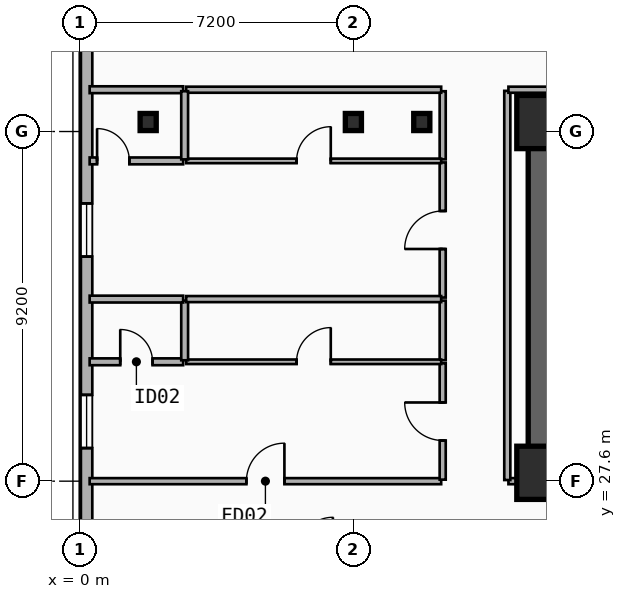
"""IFC4 building model, lengths in metres.
Left out: names, types, materials, properties, quantities, classifications, styles, units other than length and angle.
Written with IfcOpenShell. Run it as: python <this file> out.ifc"""

import sys

from ifc_helpers import new_model, si_unit, direction, frame, frame_2d, origin, origin_2d, place, context, subcontext, project, spatial, rectangle, i_section, extrude, element, fill, save


model = new_model("IFC4")
c1 = context("Model", 3, precision=1e-05, world=origin(), true_north=direction((0.0, 1.0)))
c2 = subcontext(c1, "Body", "Model", "MODEL_VIEW")
j1 = project(units=[si_unit("LENGTHUNIT", "METRE"), si_unit("PLANEANGLEUNIT", "RADIAN")], contexts=[c1])
p1 = place(None, origin())
s1 = spatial("IfcSite", under=j1, at=p1, CompositionType="ELEMENT")
p2 = place(p1, origin())
s2 = spatial("IfcBuilding", under=s1, at=p2, CompositionType="ELEMENT")
p3 = place(p2, frame((0.0, 0.0, 53.5)))
s3 = spatial("IfcBuildingStorey", under=s2, at=p3, CompositionType="ELEMENT", Elevation=53.5)
p4 = place(p3, frame((12.15, 37.05, 0.0), z_axis=(0.0, 0.0, 1.0), x_axis=(1.0, 0.0, 0.0)))
e1 = element("IfcWall", 1, at=p4, inside=s3, PredefinedType="SHEAR", context=c2, shape_type="SweptSolid", body=[
    extrude(rectangle(XDim=33.23, YDim=0.7, at=frame_2d((16.615, 0.0))), origin(), (0.0, 0.0, 1.0), 3.5),
])
p5 = place(p3, frame((21.18, 27.82, 0.0), z_axis=(0.0, 0.0, 1.0), x_axis=(-1.0, 0.0, 0.0)))
e2 = element("IfcWall", 2, at=p5, inside=s3, PredefinedType="SHEAR", context=c2, shape_type="SweptSolid", body=[
    extrude(rectangle(XDim=9.03, YDim=0.7, at=frame_2d((4.515, 0.0))), origin(), (0.0, 0.0, 1.0), 3.5),
])
p6 = place(p5, frame((2.68, 0.0, 0.0)))
e3 = element("IfcOpeningElement", 3, at=p6, cuts=e2, PredefinedType="OPENING", context=c2, shape_type="SweptSolid", body=[
    extrude(rectangle(XDim=1.1, YDim=2.15, at=frame_2d((0.55, 1.075))), frame((0.0, 0.36, 0.0), z_axis=(0.0, -1.0, 0.0), x_axis=(1.0, 0.0, 0.0)), (0.0, 0.0, 1.0), 0.72),
])
p7 = place(p3, frame((12.15, 28.17, 0.0), z_axis=(0.0, 0.0, 1.0), x_axis=(0.0, 1.0, 0.0)))
e4 = element("IfcWall", 4, at=p7, inside=s3, PredefinedType="SHEAR", context=c2, shape_type="SweptSolid", body=[
    extrude(rectangle(XDim=8.53, YDim=0.7, at=frame_2d((4.265, 0.0))), origin(), (0.0, 0.0, 1.0), 3.5),
])
for number, where, z_axis, x_axis in (
    (5, (12.2, 27.82, 0.0), (0.0, 0.0, 1.0), (1.0, 0.0, 0.0)),
    (6, (12.2, 37.05, 0.0), (0.0, 0.0, 1.0), (1.0, 0.0, 0.0)),
):
    element("IfcColumn", number, at=place(p3, frame(where, z_axis=z_axis, x_axis=x_axis)), inside=s3, PredefinedType="COLUMN", context=c2, shape_type="SweptSolid", body=[
        extrude(rectangle(XDim=1.4, YDim=1.4, at=origin_2d()), origin(), (0.0, 0.0, 1.0), 3.5),
    ])
for number, where, z_axis, x_axis in (
    (7, (9.0, 37.05, 0.0), (0.0, 0.0, 1.0), (1.0, 0.0, 0.0)),
    (8, (1.8, 37.05, 0.0), (0.0, 0.0, 1.0), (1.0, 0.0, 0.0)),
    (9, (7.2, 37.05, 0.0), (0.0, 0.0, 1.0), (1.0, 0.0, 0.0)),
):
    element("IfcColumn", number, at=place(p3, frame(where, z_axis=z_axis, x_axis=x_axis)), inside=s3, PredefinedType="COLUMN", context=c2, shape_type="SweptSolid", body=[
        extrude(i_section(OverallWidth=0.424, OverallDepth=0.45, WebThickness=0.041, FlangeThickness=0.065, FilletRadius=0.015, at=origin_2d()), origin(), (0.0, 0.0, 1.0), 3.5),
    ])
p8 = place(p3, frame((0.18, 25.8, 0.0), z_axis=(0.0, 0.0, 1.0), x_axis=(0.0, 1.0, 0.0)))
e10 = element("IfcWall", 10, at=p8, inside=s3, PredefinedType="SOLIDWALL", context=c2, shape_type="SweptSolid", body=[
    extrude(rectangle(XDim=15.2, YDim=0.3, at=frame_2d((7.6, 0.0))), origin(), (0.0, 0.0, 1.0), 3.24),
])
p9 = place(p8, frame((2.67, 0.0, 0.48)))
e11 = element("IfcOpeningElement", 11, at=p9, cuts=e10, PredefinedType="OPENING", context=c2, shape_type="SweptSolid", body=[
    extrude(rectangle(XDim=1.4, YDim=1.8, at=frame_2d((0.7, 0.9))), frame((0.0, 0.16, 0.0), z_axis=(0.0, -1.0, 0.0), x_axis=(1.0, 0.0, 0.0)), (0.0, 0.0, 1.0), 0.32),
])
p10 = place(p8, frame((7.709, 0.0, 0.48)))
e12 = element("IfcOpeningElement", 12, at=p10, cuts=e10, PredefinedType="OPENING", context=c2, shape_type="SweptSolid", body=[
    extrude(rectangle(XDim=1.4, YDim=1.8, at=frame_2d((0.7, 0.9))), frame((0.0, 0.16, 0.0), z_axis=(0.0, -1.0, 0.0), x_axis=(1.0, 0.0, 0.0)), (0.0, 0.0, 1.0), 0.32),
])
p11 = place(p3, frame((0.26, 27.6, 0.0), z_axis=(0.0, 0.0, 1.0), x_axis=(1.0, 0.0, 0.0)))
e13 = element("IfcWall", 13, at=p11, inside=s3, PredefinedType="PARTITIONING", context=c2, shape_type="SweptSolid", body=[
    extrude(rectangle(XDim=9.25, YDim=0.16, at=frame_2d((4.625, 0.0))), origin(), (0.0, 0.0, 1.0), 2.57),
])
p12 = place(p11, frame((4.125, 0.0, 0.0)))
e14 = element("IfcOpeningElement", 14, at=p12, cuts=e13, PredefinedType="OPENING", context=c2, shape_type="SweptSolid", body=[
    extrude(rectangle(XDim=1.0, YDim=2.15, at=frame_2d((0.5, 1.075))), frame((0.0, 0.09, 0.0), z_axis=(0.0, -1.0, 0.0), x_axis=(1.0, 0.0, 0.0)), (0.0, 0.0, 1.0), 0.18),
])
p13 = place(p3, frame((9.55, 27.64, 0.0), z_axis=(0.0, 0.0, 1.0), x_axis=(0.0, 1.0, 0.0)))
e15 = element("IfcWall", 15, at=p13, inside=s3, PredefinedType="PARTITIONING", context=c2, shape_type="SweptSolid", body=[
    extrude(rectangle(XDim=3.061, YDim=0.16, at=frame_2d((1.531, 0.0))), origin(), (0.0, 0.0, 1.0), 3.24),
])
p14 = place(p13, frame((1.031, 0.0, 0.0)))
e16 = element("IfcOpeningElement", 16, at=p14, cuts=e15, PredefinedType="OPENING", context=c2, shape_type="SweptSolid", body=[
    extrude(rectangle(XDim=1.0, YDim=2.15, at=frame_2d((0.5, 1.075))), frame((0.0, 0.09, 0.0), z_axis=(0.0, -1.0, 0.0), x_axis=(1.0, 0.0, 0.0)), (0.0, 0.0, 1.0), 0.18),
])
p15 = place(p3, frame((9.55, 30.781, 0.0), z_axis=(0.0, 0.0, 1.0), x_axis=(0.0, 1.0, 0.0)))
e17 = element("IfcWall", 17, at=p15, inside=s3, PredefinedType="PARTITIONING", context=c2, shape_type="SweptSolid", body=[
    extrude(rectangle(XDim=1.57, YDim=0.16, at=frame_2d((0.785, 0.0))), origin(), (0.0, 0.0, 1.0), 3.24),
])
p16 = place(p3, frame((9.55, 32.431, 0.0), z_axis=(0.0, 0.0, 1.0), x_axis=(0.0, 1.0, 0.0)))
e18 = element("IfcWall", 18, at=p16, inside=s3, PredefinedType="PARTITIONING", context=c2, shape_type="SweptSolid", body=[
    extrude(rectangle(XDim=3.556, YDim=0.16, at=frame_2d((1.778, 0.0))), origin(), (0.0, 0.0, 1.0), 3.24),
])
p17 = place(p16, frame((1.278, 0.0, 0.0)))
e19 = element("IfcOpeningElement", 19, at=p17, cuts=e18, PredefinedType="OPENING", context=c2, shape_type="SweptSolid", body=[
    extrude(rectangle(XDim=1.0, YDim=2.15, at=frame_2d((0.5, 1.075))), frame((0.0, 0.09, 0.0), z_axis=(0.0, -1.0, 0.0), x_axis=(1.0, 0.0, 0.0)), (0.0, 0.0, 1.0), 0.18),
])
p18 = place(p3, frame((9.55, 36.067, 0.0), z_axis=(0.0, 0.0, 1.0), x_axis=(0.0, 1.0, 0.0)))
e20 = element("IfcWall", 20, at=p18, inside=s3, PredefinedType="PARTITIONING", context=c2, shape_type="SweptSolid", body=[
    extrude(rectangle(XDim=1.793, YDim=0.16, at=frame_2d((0.896, 0.0))), origin(), (0.0, 0.0, 1.0), 2.72),
])
p19 = place(p3, frame((0.26, 37.9, 0.0), z_axis=(0.0, 0.0, 1.0), x_axis=(1.0, 0.0, 0.0)))
e21 = element("IfcWall", 21, at=p19, inside=s3, PredefinedType="PLUMBINGWALL", context=c2, shape_type="SweptSolid", body=[
    extrude(rectangle(XDim=2.46, YDim=0.18, at=frame_2d((1.23, 0.0))), origin(), (0.0, 0.0, 1.0), 3.24),
])
p20 = place(p3, frame((2.8, 37.9, 0.0), z_axis=(0.0, 0.0, 1.0), x_axis=(1.0, 0.0, 0.0)))
e22 = element("IfcWall", 22, at=p20, inside=s3, PredefinedType="PARTITIONING", context=c2, shape_type="SweptSolid", body=[
    extrude(rectangle(XDim=6.71, YDim=0.16, at=frame_2d((3.355, 0.0))), origin(), (0.0, 0.0, 1.0), 3.24),
])
p21 = place(p3, frame((0.26, 30.741, 0.0), z_axis=(0.0, 0.0, 1.0), x_axis=(1.0, 0.0, 0.0)))
e23 = element("IfcWall", 23, at=p21, inside=s3, PredefinedType="PLUMBINGWALL", context=c2, shape_type="SweptSolid", body=[
    extrude(rectangle(XDim=2.46, YDim=0.18, at=frame_2d((1.23, 0.0))), origin(), (0.0, 0.0, 1.0), 2.57),
])
p22 = place(p21, frame((0.805, 0.0, 0.0)))
e24 = element("IfcOpeningElement", 24, at=p22, cuts=e23, PredefinedType="OPENING", context=c2, shape_type="SweptSolid", body=[
    extrude(rectangle(XDim=0.85, YDim=2.1, at=frame_2d((0.425, 1.05))), frame((0.0, 0.1, 0.0), z_axis=(0.0, -1.0, 0.0), x_axis=(1.0, 0.0, 0.0)), (0.0, 0.0, 1.0), 0.2),
])
p23 = place(p3, frame((2.8, 30.741, 0.0), z_axis=(0.0, 0.0, 1.0), x_axis=(1.0, 0.0, 0.0)))
e25 = element("IfcWall", 25, at=p23, inside=s3, PredefinedType="PARTITIONING", context=c2, shape_type="SweptSolid", body=[
    extrude(rectangle(XDim=6.71, YDim=0.12, at=frame_2d((3.355, 0.0))), origin(), (0.0, 0.0, 1.0), 2.57),
])
p24 = place(p23, frame((2.905, 0.0, 0.0)))
e26 = element("IfcOpeningElement", 26, at=p24, cuts=e25, PredefinedType="OPENING", context=c2, shape_type="SweptSolid", body=[
    extrude(rectangle(XDim=0.9, YDim=2.1, at=frame_2d((0.45, 1.05))), frame((0.0, 0.07, 0.0), z_axis=(0.0, -1.0, 0.0), x_axis=(1.0, 0.0, 0.0)), (0.0, 0.0, 1.0), 0.14),
])
p25 = place(p3, frame((2.76, 30.781, 0.0), z_axis=(0.0, 0.0, 1.0), x_axis=(0.0, 1.0, 0.0)))
e27 = element("IfcWall", 27, at=p25, inside=s3, PredefinedType="PLUMBINGWALL", context=c2, shape_type="SweptSolid", body=[
    extrude(rectangle(XDim=1.57, YDim=0.18, at=frame_2d((0.785, 0.0))), origin(), (0.0, 0.0, 1.0), 3.24),
])
p26 = place(p3, frame((0.26, 32.391, 0.0), z_axis=(0.0, 0.0, 1.0), x_axis=(1.0, 0.0, 0.0)))
e28 = element("IfcWall", 28, at=p26, inside=s3, PredefinedType="PLUMBINGWALL", context=c2, shape_type="SweptSolid", body=[
    extrude(rectangle(XDim=2.46, YDim=0.18, at=frame_2d((1.23, 0.0))), origin(), (0.0, 0.0, 1.0), 2.57),
])
p27 = place(p3, frame((2.8, 32.391, 0.0), z_axis=(0.0, 0.0, 1.0), x_axis=(1.0, 0.0, 0.0)))
e29 = element("IfcWall", 29, at=p27, inside=s3, PredefinedType="PARTITIONING", context=c2, shape_type="SweptSolid", body=[
    extrude(rectangle(XDim=6.71, YDim=0.16, at=frame_2d((3.355, 0.0))), origin(), (0.0, 0.0, 1.0), 2.57),
])
p28 = place(p3, frame((0.26, 36.027, 0.0), z_axis=(0.0, 0.0, 1.0), x_axis=(1.0, 0.0, 0.0)))
e30 = element("IfcWall", 30, at=p28, inside=s3, PredefinedType="PLUMBINGWALL", context=c2, shape_type="SweptSolid", body=[
    extrude(rectangle(XDim=2.46, YDim=0.18, at=frame_2d((1.23, 0.0))), origin(), (0.0, 0.0, 1.0), 2.57),
])
p29 = place(p28, frame((0.195, 0.0, 0.0)))
e31 = element("IfcOpeningElement", 31, at=p29, cuts=e30, PredefinedType="OPENING", context=c2, shape_type="SweptSolid", body=[
    extrude(rectangle(XDim=0.85, YDim=2.1, at=frame_2d((0.425, 1.05))), frame((0.0, 0.1, 0.0), z_axis=(0.0, -1.0, 0.0), x_axis=(1.0, 0.0, 0.0)), (0.0, 0.0, 1.0), 0.2),
])
p30 = place(p3, frame((2.8, 36.027, 0.0), z_axis=(0.0, 0.0, 1.0), x_axis=(1.0, 0.0, 0.0)))
e32 = element("IfcWall", 32, at=p30, inside=s3, PredefinedType="PARTITIONING", context=c2, shape_type="SweptSolid", body=[
    extrude(rectangle(XDim=6.71, YDim=0.12, at=frame_2d((3.355, 0.0))), origin(), (0.0, 0.0, 1.0), 2.57),
])
p31 = place(p30, frame((2.905, 0.0, 0.0)))
e33 = element("IfcOpeningElement", 33, at=p31, cuts=e32, PredefinedType="OPENING", context=c2, shape_type="SweptSolid", body=[
    extrude(rectangle(XDim=0.9, YDim=2.1, at=frame_2d((0.45, 1.05))), frame((0.0, 0.07, 0.0), z_axis=(0.0, -1.0, 0.0), x_axis=(1.0, 0.0, 0.0)), (0.0, 0.0, 1.0), 0.14),
])
p32 = place(p3, frame((2.76, 36.067, 0.0), z_axis=(0.0, 0.0, 1.0), x_axis=(0.0, 1.0, 0.0)))
e34 = element("IfcWall", 34, at=p32, inside=s3, PredefinedType="PLUMBINGWALL", context=c2, shape_type="SweptSolid", body=[
    extrude(rectangle(XDim=1.793, YDim=0.18, at=frame_2d((0.896, 0.0))), origin(), (0.0, 0.0, 1.0), 2.72),
])
p33 = place(p3, frame((11.28, 27.6, 0.0), z_axis=(0.0, 0.0, 1.0), x_axis=(1.0, 0.0, 0.0)))
e35 = element("IfcWall", 35, at=p33, inside=s3, PredefinedType="PARTITIONING", context=c2, shape_type="SweptSolid", body=[
    extrude(rectangle(XDim=0.84, YDim=0.16, at=frame_2d((0.42, 0.0))), origin(), (0.0, 0.0, 1.0), 2.28),
])
p34 = place(p3, frame((11.25, 27.63, 0.0), z_axis=(0.0, 0.0, 1.0), x_axis=(0.0, 1.0, 0.0)))
e36 = element("IfcWall", 36, at=p34, inside=s3, PredefinedType="PARTITIONING", context=c2, shape_type="SweptSolid", body=[
    extrude(rectangle(XDim=10.24, YDim=0.16, at=frame_2d((5.12, 0.0))), origin(), (0.0, 0.0, 1.0), 2.72),
])
p35 = place(p3, frame((11.28, 37.9, 0.0), z_axis=(0.0, 0.0, 1.0), x_axis=(1.0, 0.0, 0.0)))
e37 = element("IfcWall", 37, at=p35, inside=s3, PredefinedType="PARTITIONING", context=c2, shape_type="SweptSolid", body=[
    extrude(rectangle(XDim=35.04, YDim=0.16, at=frame_2d((17.52, 0.0))), origin(), (0.0, 0.0, 1.0), 3.24),
])
p36 = place(p9, origin())
e38 = element("IfcWindow", 38, at=p36, inside=s3, PartitioningType="SINGLE_PANEL", PredefinedType="WINDOW", context=c2, shape_type="SweptSolid", body=[
    extrude(rectangle(XDim=1.4, YDim=1.8, at=frame_2d((0.7, 0.9))), frame((0.0, 0.03, 0.0), z_axis=(0.0, -1.0, 0.0), x_axis=(1.0, 0.0, 0.0)), (0.0, 0.0, 1.0), 0.06),
])
fill(e11, e38)
p37 = place(p10, origin())
e39 = element("IfcWindow", 39, at=p37, inside=s3, PartitioningType="SINGLE_PANEL", PredefinedType="WINDOW", context=c2, shape_type="SweptSolid", body=[
    extrude(rectangle(XDim=1.4, YDim=1.8, at=frame_2d((0.7, 0.9))), frame((0.0, 0.03, 0.0), z_axis=(0.0, -1.0, 0.0), x_axis=(1.0, 0.0, 0.0)), (0.0, 0.0, 1.0), 0.06),
])
fill(e12, e39)
p38 = place(p12, origin())
e40 = element("IfcDoor", 40, at=p38, inside=s3, OperationType="SINGLE_SWING_RIGHT", PredefinedType="DOOR", context=c2, shape_type="SweptSolid", body=[
    extrude(rectangle(XDim=1.0, YDim=2.15, at=frame_2d((0.5, 1.075))), frame((0.0, 0.025, 0.0), z_axis=(0.0, -1.0, 0.0), x_axis=(1.0, 0.0, 0.0)), (0.0, 0.0, 1.0), 0.05),
])
fill(e14, e40)
p39 = place(p14, origin())
e41 = element("IfcDoor", 41, at=p39, inside=s3, OperationType="SINGLE_SWING_RIGHT", PredefinedType="DOOR", context=c2, shape_type="SweptSolid", body=[
    extrude(rectangle(XDim=1.0, YDim=2.15, at=frame_2d((0.5, 1.075))), frame((0.0, 0.025, 0.0), z_axis=(0.0, -1.0, 0.0), x_axis=(1.0, 0.0, 0.0)), (0.0, 0.0, 1.0), 0.05),
])
fill(e16, e41)
p40 = place(p17, origin())
e42 = element("IfcDoor", 42, at=p40, inside=s3, OperationType="SINGLE_SWING_LEFT", PredefinedType="DOOR", context=c2, shape_type="SweptSolid", body=[
    extrude(rectangle(XDim=1.0, YDim=2.15, at=frame_2d((0.5, 1.075))), frame((0.0, 0.025, 0.0), z_axis=(0.0, -1.0, 0.0), x_axis=(1.0, 0.0, 0.0)), (0.0, 0.0, 1.0), 0.05),
])
fill(e19, e42)
p41 = place(p22, origin())
e43 = element("IfcDoor", 43, at=p41, inside=s3, OperationType="SINGLE_SWING_LEFT", PredefinedType="DOOR", context=c2, shape_type="SweptSolid", body=[
    extrude(rectangle(XDim=0.85, YDim=2.1, at=frame_2d((0.425, 1.05))), frame((0.0, 0.025, 0.0), z_axis=(0.0, -1.0, 0.0), x_axis=(1.0, 0.0, 0.0)), (0.0, 0.0, 1.0), 0.05),
])
fill(e24, e43)
p42 = place(p24, origin())
e44 = element("IfcDoor", 44, at=p42, inside=s3, OperationType="SINGLE_SWING_RIGHT", PredefinedType="DOOR", context=c2, shape_type="SweptSolid", body=[
    extrude(rectangle(XDim=0.9, YDim=2.1, at=frame_2d((0.45, 1.05))), frame((0.0, 0.025, 0.0), z_axis=(0.0, -1.0, 0.0), x_axis=(1.0, 0.0, 0.0)), (0.0, 0.0, 1.0), 0.05),
])
fill(e26, e44)
p43 = place(p29, origin())
e45 = element("IfcDoor", 45, at=p43, inside=s3, OperationType="SINGLE_SWING_LEFT", PredefinedType="DOOR", context=c2, shape_type="SweptSolid", body=[
    extrude(rectangle(XDim=0.85, YDim=2.1, at=frame_2d((0.425, 1.05))), frame((0.0, 0.025, 0.0), z_axis=(0.0, -1.0, 0.0), x_axis=(1.0, 0.0, 0.0)), (0.0, 0.0, 1.0), 0.05),
])
fill(e31, e45)
p44 = place(p31, origin())
e46 = element("IfcDoor", 46, at=p44, inside=s3, OperationType="SINGLE_SWING_RIGHT", PredefinedType="DOOR", context=c2, shape_type="SweptSolid", body=[
    extrude(rectangle(XDim=0.9, YDim=2.1, at=frame_2d((0.45, 1.05))), frame((0.0, 0.025, 0.0), z_axis=(0.0, -1.0, 0.0), x_axis=(1.0, 0.0, 0.0)), (0.0, 0.0, 1.0), 0.05),
])
fill(e33, e46)
save(model, sys.argv[1])
